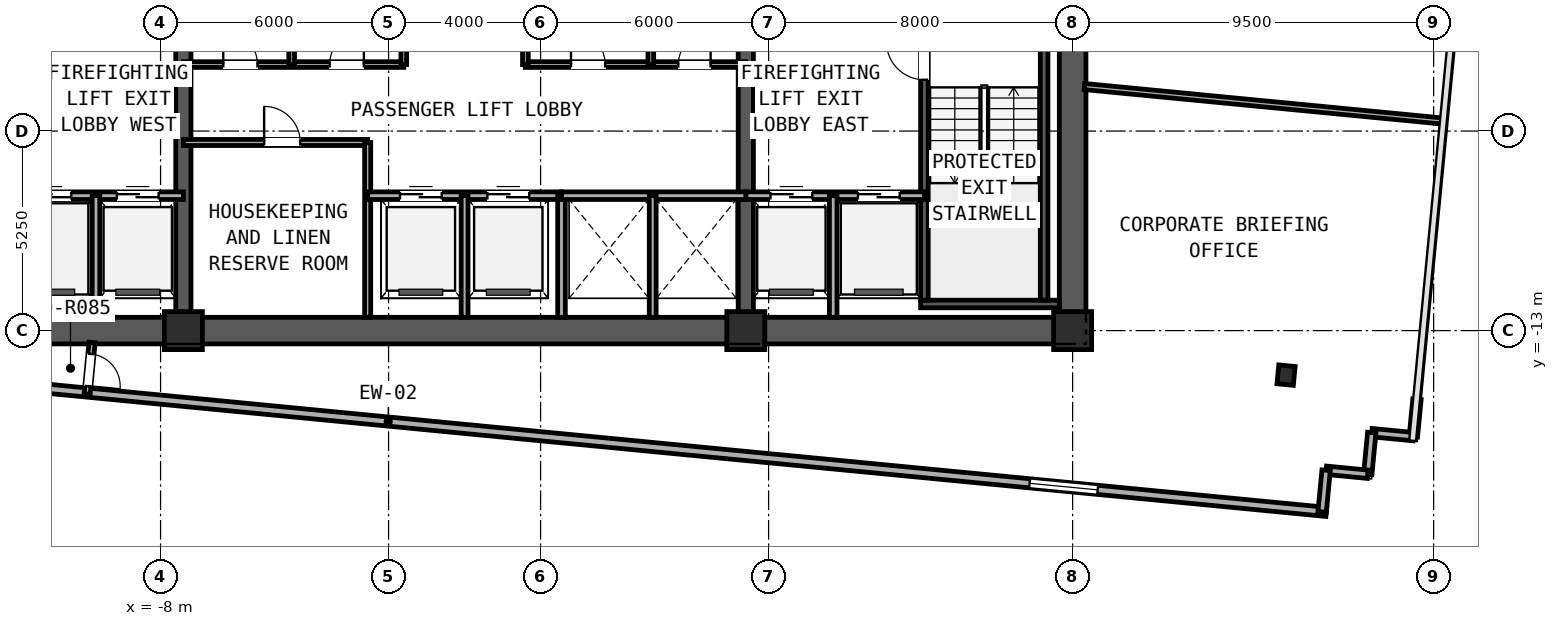
"""IFC4 building model, lengths in metres.
Left out: names, types, materials, properties, quantities, classifications, styles, units other than length and angle.
Written with IfcOpenShell. Run it as: python <this file> out.ifc"""

import sys

from ifc_helpers import new_model, si_unit, direction, frame, frame_2d, origin, origin_2d, place, context, subcontext, project, spatial, rectangle, i_section, extrude, element, fill, save


model = new_model("IFC4")
c1 = context("Model", 3, precision=1e-05, world=origin(), true_north=direction((0.0, 1.0)))
c2 = subcontext(c1, "Body", "Model", "MODEL_VIEW")
j1 = project(units=[si_unit("LENGTHUNIT", "METRE"), si_unit("PLANEANGLEUNIT", "RADIAN")], contexts=[c1])
p1 = place(None, origin())
s1 = spatial("IfcSite", under=j1, at=p1, CompositionType="ELEMENT")
p2 = place(p1, origin())
s2 = spatial("IfcBuilding", under=s1, at=p2, CompositionType="ELEMENT")
p3 = place(p2, frame((0.0, 0.0, 166.95)))
s3 = spatial("IfcBuildingStorey", under=s2, at=p3, CompositionType="ELEMENT", Elevation=166.95)
p4 = place(p3, frame((-16.35, -13.0, 0.0), z_axis=(0.0, 0.0, 1.0), x_axis=(1.0, 0.0, 0.0)))
e1 = element("IfcWall", 1, at=p4, inside=s3, PredefinedType="SHEAR", context=c2, shape_type="SweptSolid", body=[
    extrude(rectangle(XDim=32.7, YDim=0.7, at=frame_2d((16.35, 0.0))), origin(), (0.0, 0.0, 1.0), 2.91),
])
p5 = place(p3, frame((16.0, -12.65, 0.0), z_axis=(0.0, 0.0, 1.0), x_axis=(0.0, 1.0, 0.0)))
e2 = element("IfcWall", 2, at=p5, inside=s3, PredefinedType="SHEAR", context=c2, shape_type="SweptSolid", body=[
    extrude(rectangle(XDim=9.8, YDim=0.7, at=frame_2d((4.9, 0.0))), origin(), (0.0, 0.0, 1.0), 2.91),
])
for number, where, z_axis, x_axis in (
    (3, (-7.4, -12.65, 0.0), (0.0, 0.0, 1.0), (0.0, 1.0, 0.0)),
    (4, (7.4, -12.65, 0.0), (0.0, 0.0, 1.0), (0.0, 1.0, 0.0)),
):
    element("IfcWall", number, at=place(p3, frame(where, z_axis=z_axis, x_axis=x_axis)), inside=s3, PredefinedType="SHEAR", context=c2, shape_type="SweptSolid", body=[
        extrude(rectangle(XDim=9.8, YDim=0.4, at=frame_2d((4.9, 0.0))), origin(), (0.0, 0.0, 1.0), 3.19),
    ])
p6 = place(p3, frame((12.0, -12.3, 0.0), z_axis=(0.0, 0.0, 1.0), x_axis=(1.0, 0.0, 0.0)))
e5 = element("IfcWall", 5, at=p6, inside=s3, PredefinedType="SOLIDWALL", context=c2, shape_type="SweptSolid", body=[
    extrude(rectangle(XDim=3.65, YDim=0.2, at=frame_2d((1.825, 0.0))), origin(), (0.0, 0.0, 1.0), 3.19),
])
p7 = place(p3, frame((12.1, -12.2, 0.0), z_axis=(0.0, 0.0, 1.0), x_axis=(0.0, 1.0, 0.0)))
e6 = element("IfcWall", 6, at=p7, inside=s3, PredefinedType="SOLIDWALL", context=c2, shape_type="SweptSolid", body=[
    extrude(rectangle(XDim=7.0, YDim=0.2, at=frame_2d((3.5, 0.0))), origin(), (0.0, 0.0, 1.0), 3.19),
])
p8 = place(p7, frame((5.8, 0.0, 0.0)))
e7 = element("IfcOpeningElement", 7, at=p8, cuts=e6, PredefinedType="OPENING", context=c2, shape_type="SweptSolid", body=[
    extrude(rectangle(XDim=1.0, YDim=2.1, at=frame_2d((0.5, 1.05))), frame((0.0, 0.11, 0.0), z_axis=(0.0, -1.0, 0.0), x_axis=(1.0, 0.0, 0.0)), (0.0, 0.0, 1.0), 0.22),
])
p9 = place(p3, frame((15.25, -12.2, 0.0), z_axis=(0.0, 0.0, 1.0), x_axis=(0.0, 1.0, 0.0)))
e8 = element("IfcWall", 8, at=p9, inside=s3, PredefinedType="SOLIDWALL", context=c2, shape_type="SweptSolid", body=[
    extrude(rectangle(XDim=7.0, YDim=0.2, at=frame_2d((3.5, 0.0))), origin(), (0.0, 0.0, 1.0), 3.19),
])
for number, where, z_axis, x_axis in (
    (9, (-7.4, -13.0, 0.0), (0.0, 0.0, 1.0), (1.0, 0.0, 0.0)),
    (10, (7.4, -13.0, 0.0), (0.0, 0.0, 1.0), (1.0, 0.0, 0.0)),
    (11, (16.0, -13.0, 0.0), (0.0, 0.0, 1.0), (1.0, 0.0, 0.0)),
):
    element("IfcColumn", number, at=place(p3, frame(where, z_axis=z_axis, x_axis=x_axis)), inside=s3, PredefinedType="COLUMN", context=c2, shape_type="SweptSolid", body=[
        extrude(rectangle(XDim=1.0, YDim=1.0, at=origin_2d()), origin(), (0.0, 0.0, 1.0), 3.45),
    ])
p10 = place(p3, frame((21.616, -14.172, 0.0), z_axis=(0.0, 0.0, 1.0), x_axis=(0.995396198367, -0.09584575252, 0.0)))
e12 = element("IfcColumn", 12, at=p10, inside=s3, PredefinedType="COLUMN", context=c2, shape_type="SweptSolid", body=[
    extrude(i_section(OverallWidth=0.432, OverallDepth=0.498, WebThickness=0.056, FlangeThickness=0.089, FilletRadius=0.031, at=origin_2d()), origin(), (0.0, 0.0, 1.0), 3.45),
])
p11 = place(p3, frame((-26.695, -13.016, 0.0), z_axis=(0.0, 0.0, 1.0), x_axis=(0.995396268366, -0.095845025554, 0.0)))
e13 = element("IfcWall", 13, at=p11, inside=s3, PredefinedType="STANDARD", context=c2, shape_type="SweptSolid", body=[
    extrude(rectangle(XDim=49.6, YDim=0.24, at=frame_2d((24.8, 0.0))), origin(), (0.0, 0.0, 1.0), 3.19),
])
p12 = place(p11, frame((6.044, 0.0, 0.7)))
e14 = element("IfcOpeningElement", 14, at=p12, cuts=e13, PredefinedType="OPENING", context=c2, shape_type="SweptSolid", body=[
    extrude(rectangle(XDim=1.8, YDim=1.5, at=frame_2d((0.9, 0.75))), frame((0.0, 0.13, 0.0), z_axis=(0.0, -1.0, 0.0), x_axis=(1.0, 0.0, 0.0)), (0.0, 0.0, 1.0), 0.26),
])
p13 = place(p11, frame((41.756, 0.0, 0.7)))
e15 = element("IfcOpeningElement", 15, at=p13, cuts=e13, PredefinedType="OPENING", context=c2, shape_type="SweptSolid", body=[
    extrude(rectangle(XDim=1.8, YDim=1.5, at=frame_2d((0.9, 0.75))), frame((0.0, 0.13, 0.0), z_axis=(0.0, -1.0, 0.0), x_axis=(1.0, 0.0, 0.0)), (0.0, 0.0, 1.0), 0.26),
])
p14 = place(p3, frame((25.062, -14.805, 0.0), z_axis=(0.0, 0.0, 1.0), x_axis=(-0.095914428506, -0.995389583231, 0.0)))
e16 = element("IfcWall", 16, at=p14, inside=s3, PredefinedType="STANDARD", context=c2, shape_type="SweptSolid", body=[
    extrude(rectangle(XDim=0.99, YDim=0.22, at=frame_2d((0.495, 0.0))), origin(), (0.0, 0.0, 1.0), 3.19),
])
for number, where, z_axis, x_axis in (
    (17, (24.967, -15.791, 0.0), (0.0, 0.0, 1.0), (-0.995, 0.096, 0.0)),
    (18, (23.872, -15.685, 0.0), (0.0, 0.0, 1.0), (-0.096, -0.995, 0.0)),
    (19, (23.766, -16.78, 0.0), (0.0, 0.0, 1.0), (-0.995, 0.096, 0.0)),
    (20, (22.671, -16.675, 0.0), (0.0, 0.0, 1.0), (-0.096, -0.995, 0.0)),
):
    element("IfcWall", number, at=place(p3, frame(where, z_axis=z_axis, x_axis=x_axis)), inside=s3, PredefinedType="STANDARD", context=c2, shape_type="SweptSolid", body=[
        extrude(rectangle(XDim=1.1, YDim=0.22, at=frame_2d((0.55, 0.0))), origin(), (0.0, 0.0, 1.0), 3.19),
    ])
p15 = place(p3, frame((-12.1, -9.45, 0.0), z_axis=(0.0, 0.0, 1.0), x_axis=(1.0, 0.0, 0.0)))
e21 = element("IfcWall", 21, at=p15, inside=s3, PredefinedType="PARTITIONING", context=c2, shape_type="SweptSolid", body=[
    extrude(rectangle(XDim=4.7, YDim=0.2, at=frame_2d((2.35, 0.0))), origin(), (0.0, 0.0, 1.0), 3.19),
])
p16 = place(p15, frame((0.65, 0.0, 0.0)))
e22 = element("IfcOpeningElement", 22, at=p16, cuts=e21, PredefinedType="OPENING", context=c2, shape_type="SweptSolid", body=[
    extrude(rectangle(XDim=1.1, YDim=2.2, at=frame_2d((0.55, 1.1))), frame((0.0, 0.11, 0.0), z_axis=(0.0, -1.0, 0.0), x_axis=(1.0, 0.0, 0.0)), (0.0, 0.0, 1.0), 0.22),
])
p17 = place(p15, frame((2.95, 0.0, 0.0)))
e23 = element("IfcOpeningElement", 23, at=p17, cuts=e21, PredefinedType="OPENING", context=c2, shape_type="SweptSolid", body=[
    extrude(rectangle(XDim=1.1, YDim=2.2, at=frame_2d((0.55, 1.1))), frame((0.0, 0.11, 0.0), z_axis=(0.0, -1.0, 0.0), x_axis=(1.0, 0.0, 0.0)), (0.0, 0.0, 1.0), 0.22),
])
p18 = place(p3, frame((-9.7, -12.65, 0.0), z_axis=(0.0, 0.0, 1.0), x_axis=(0.0, 1.0, 0.0)))
e24 = element("IfcWall", 24, at=p18, inside=s3, PredefinedType="PARTITIONING", context=c2, shape_type="SweptSolid", body=[
    extrude(rectangle(XDim=3.2, YDim=0.2, at=frame_2d((1.6, 0.0))), origin(), (0.0, 0.0, 1.0), 2.225),
])
p19 = place(p3, frame((7.4, -9.45, 0.0), z_axis=(0.0, 0.0, 1.0), x_axis=(1.0, 0.0, 0.0)))
e25 = element("IfcWall", 25, at=p19, inside=s3, PredefinedType="PARTITIONING", context=c2, shape_type="SweptSolid", body=[
    extrude(rectangle(XDim=4.7, YDim=0.2, at=frame_2d((2.35, 0.0))), origin(), (0.0, 0.0, 1.0), 3.19),
])
p20 = place(p19, frame((2.95, 0.0, 0.0)))
e26 = element("IfcOpeningElement", 26, at=p20, cuts=e25, PredefinedType="OPENING", context=c2, shape_type="SweptSolid", body=[
    extrude(rectangle(XDim=1.1, YDim=2.2, at=frame_2d((0.55, 1.1))), frame((0.0, 0.11, 0.0), z_axis=(0.0, -1.0, 0.0), x_axis=(1.0, 0.0, 0.0)), (0.0, 0.0, 1.0), 0.22),
])
p21 = place(p19, frame((0.65, 0.0, 0.0)))
e27 = element("IfcOpeningElement", 27, at=p21, cuts=e25, PredefinedType="OPENING", context=c2, shape_type="SweptSolid", body=[
    extrude(rectangle(XDim=1.1, YDim=2.2, at=frame_2d((0.55, 1.1))), frame((0.0, 0.11, 0.0), z_axis=(0.0, -1.0, 0.0), x_axis=(1.0, 0.0, 0.0)), (0.0, 0.0, 1.0), 0.22),
])
p22 = place(p3, frame((9.7, -12.65, 0.0), z_axis=(0.0, 0.0, 1.0), x_axis=(0.0, 1.0, 0.0)))
e28 = element("IfcWall", 28, at=p22, inside=s3, PredefinedType="PARTITIONING", context=c2, shape_type="SweptSolid", body=[
    extrude(rectangle(XDim=3.2, YDim=0.2, at=frame_2d((1.6, 0.0))), origin(), (0.0, 0.0, 1.0), 2.225),
])
p23 = place(p3, frame((-7.4, -8.05, 0.0), z_axis=(0.0, 0.0, 1.0), x_axis=(1.0, 0.0, 0.0)))
e29 = element("IfcWall", 29, at=p23, inside=s3, PredefinedType="PARTITIONING", context=c2, shape_type="SweptSolid", body=[
    extrude(rectangle(XDim=4.85, YDim=0.16, at=frame_2d((2.425, 0.0))), origin(), (0.0, 0.0, 1.0), 3.19),
])
p24 = place(p23, frame((2.125, 0.0, 0.0)))
e30 = element("IfcOpeningElement", 30, at=p24, cuts=e29, PredefinedType="OPENING", context=c2, shape_type="SweptSolid", body=[
    extrude(rectangle(XDim=0.95, YDim=2.15, at=frame_2d((0.475, 1.075))), frame((0.0, 0.09, 0.0), z_axis=(0.0, -1.0, 0.0), x_axis=(1.0, 0.0, 0.0)), (0.0, 0.0, 1.0), 0.18),
])
p25 = place(p3, frame((-2.55, -12.65, 0.0), z_axis=(0.0, 0.0, 1.0), x_axis=(0.0, 1.0, 0.0)))
e31 = element("IfcWall", 31, at=p25, inside=s3, PredefinedType="PARTITIONING", context=c2, shape_type="SweptSolid", body=[
    extrude(rectangle(XDim=4.6, YDim=0.16, at=frame_2d((2.3, 0.0))), origin(), (0.0, 0.0, 1.0), 2.225),
])
p26 = place(p3, frame((-2.55, -9.45, 0.0), z_axis=(0.0, 0.0, 1.0), x_axis=(1.0, 0.0, 0.0)))
e32 = element("IfcWall", 32, at=p26, inside=s3, PredefinedType="PARTITIONING", context=c2, shape_type="SweptSolid", body=[
    extrude(rectangle(XDim=5.1, YDim=0.2, at=frame_2d((2.55, 0.0))), origin(), (0.0, 0.0, 1.0), 3.19),
])
p27 = place(p26, frame((0.85, 0.0, 0.0)))
e33 = element("IfcOpeningElement", 33, at=p27, cuts=e32, PredefinedType="OPENING", context=c2, shape_type="SweptSolid", body=[
    extrude(rectangle(XDim=1.1, YDim=2.2, at=frame_2d((0.55, 1.1))), frame((0.0, 0.11, 0.0), z_axis=(0.0, -1.0, 0.0), x_axis=(1.0, 0.0, 0.0)), (0.0, 0.0, 1.0), 0.22),
])
p28 = place(p26, frame((3.15, 0.0, 0.0)))
e34 = element("IfcOpeningElement", 34, at=p28, cuts=e32, PredefinedType="OPENING", context=c2, shape_type="SweptSolid", body=[
    extrude(rectangle(XDim=1.1, YDim=2.2, at=frame_2d((0.55, 1.1))), frame((0.0, 0.11, 0.0), z_axis=(0.0, -1.0, 0.0), x_axis=(1.0, 0.0, 0.0)), (0.0, 0.0, 1.0), 0.22),
])
p29 = place(p3, frame((0.0, -12.65, 0.0), z_axis=(0.0, 0.0, 1.0), x_axis=(0.0, 1.0, 0.0)))
e35 = element("IfcWall", 35, at=p29, inside=s3, PredefinedType="PARTITIONING", context=c2, shape_type="SweptSolid", body=[
    extrude(rectangle(XDim=3.2, YDim=0.18, at=frame_2d((1.6, 0.0))), origin(), (0.0, 0.0, 1.0), 2.225),
])
p30 = place(p3, frame((2.55, -12.65, 0.0), z_axis=(0.0, 0.0, 1.0), x_axis=(0.0, 1.0, 0.0)))
e36 = element("IfcWall", 36, at=p30, inside=s3, PredefinedType="PARTITIONING", context=c2, shape_type="SweptSolid", body=[
    extrude(rectangle(XDim=3.2, YDim=0.2, at=frame_2d((1.6, 0.0))), origin(), (0.0, 0.0, 1.0), 2.225),
])
p31 = place(p3, frame((2.55, -9.45, 0.0), z_axis=(0.0, 0.0, 1.0), x_axis=(1.0, 0.0, 0.0)))
e37 = element("IfcWall", 37, at=p31, inside=s3, PredefinedType="PARTITIONING", context=c2, shape_type="SweptSolid", body=[
    extrude(rectangle(XDim=4.85, YDim=0.2, at=frame_2d((2.425, 0.0))), origin(), (0.0, 0.0, 1.0), 3.19),
])
p32 = place(p3, frame((4.95, -12.65, 0.0), z_axis=(0.0, 0.0, 1.0), x_axis=(0.0, 1.0, 0.0)))
e38 = element("IfcWall", 38, at=p32, inside=s3, PredefinedType="PARTITIONING", context=c2, shape_type="SweptSolid", body=[
    extrude(rectangle(XDim=3.2, YDim=0.18, at=frame_2d((1.6, 0.0))), origin(), (0.0, 0.0, 1.0), 2.225),
])
p33 = place(p3, frame((-7.4, -6.0, 0.0), z_axis=(0.0, 0.0, 1.0), x_axis=(1.0, 0.0, 0.0)))
e39 = element("IfcWall", 39, at=p33, inside=s3, PredefinedType="PARTITIONING", context=c2, shape_type="SweptSolid", body=[
    extrude(rectangle(XDim=5.8, YDim=0.15, at=frame_2d((2.9, 0.0))), origin(), (0.0, 0.0, 1.0), 3.19),
])
p34 = place(p33, frame((1.05, 0.0, 0.0)))
e40 = element("IfcOpeningElement", 40, at=p34, cuts=e39, PredefinedType="OPENING", context=c2, shape_type="SweptSolid", body=[
    extrude(rectangle(XDim=0.9, YDim=2.1, at=frame_2d((0.45, 1.05))), frame((0.0, 0.085, 0.0), z_axis=(0.0, -1.0, 0.0), x_axis=(1.0, 0.0, 0.0)), (0.0, 0.0, 1.0), 0.17),
])
p35 = place(p33, frame((3.85, 0.0, 0.0)))
e41 = element("IfcOpeningElement", 41, at=p35, cuts=e39, PredefinedType="OPENING", context=c2, shape_type="SweptSolid", body=[
    extrude(rectangle(XDim=0.9, YDim=2.1, at=frame_2d((0.45, 1.05))), frame((0.0, 0.085, 0.0), z_axis=(0.0, -1.0, 0.0), x_axis=(1.0, 0.0, 0.0)), (0.0, 0.0, 1.0), 0.17),
])
p36 = place(p3, frame((-1.6, -6.0, 0.0), z_axis=(0.0, 0.0, 1.0), x_axis=(0.0, 1.0, 0.0)))
e42 = element("IfcWall", 42, at=p36, inside=s3, PredefinedType="PARTITIONING", context=c2, shape_type="SweptSolid", body=[
    extrude(rectangle(XDim=3.5, YDim=0.15, at=frame_2d((1.75, 0.0))), origin(), (0.0, 0.0, 1.0), 2.225),
])
p37 = place(p3, frame((1.6, -6.0, 0.0), z_axis=(0.0, 0.0, 1.0), x_axis=(1.0, 0.0, 0.0)))
e43 = element("IfcWall", 43, at=p37, inside=s3, PredefinedType="PARTITIONING", context=c2, shape_type="SweptSolid", body=[
    extrude(rectangle(XDim=5.8, YDim=0.15, at=frame_2d((2.9, 0.0))), origin(), (0.0, 0.0, 1.0), 3.19),
])
p38 = place(p37, frame((1.2, 0.0, 0.0)))
e44 = element("IfcOpeningElement", 44, at=p38, cuts=e43, PredefinedType="OPENING", context=c2, shape_type="SweptSolid", body=[
    extrude(rectangle(XDim=0.9, YDim=2.1, at=frame_2d((0.45, 1.05))), frame((0.0, 0.085, 0.0), z_axis=(0.0, -1.0, 0.0), x_axis=(1.0, 0.0, 0.0)), (0.0, 0.0, 1.0), 0.17),
])
p39 = place(p37, frame((4.025, 0.0, 0.0)))
e45 = element("IfcOpeningElement", 45, at=p39, cuts=e43, PredefinedType="OPENING", context=c2, shape_type="SweptSolid", body=[
    extrude(rectangle(XDim=0.85, YDim=2.05, at=frame_2d((0.425, 1.025))), frame((0.0, 0.085, 0.0), z_axis=(0.0, -1.0, 0.0), x_axis=(1.0, 0.0, 0.0)), (0.0, 0.0, 1.0), 0.17),
])
for number, where, z_axis, x_axis in (
    (46, (1.6, -6.0, 0.0), (0.0, 0.0, 1.0), (0.0, 1.0, 0.0)),
    (47, (-4.55, -6.0, 0.0), (0.0, 0.0, 1.0), (0.0, 1.0, 0.0)),
    (48, (4.9, -6.0, 0.0), (0.0, 0.0, 1.0), (0.0, 1.0, 0.0)),
):
    element("IfcWall", number, at=place(p3, frame(where, z_axis=z_axis, x_axis=x_axis)), inside=s3, PredefinedType="PARTITIONING", context=c2, shape_type="SweptSolid", body=[
        extrude(rectangle(XDim=3.5, YDim=0.15, at=frame_2d((1.75, 0.0))), origin(), (0.0, 0.0, 1.0), 2.225),
    ])
p40 = place(p3, frame((-9.802, -13.31, 0.0), z_axis=(0.0, 0.0, 1.0), x_axis=(-0.095930256126, -0.995388057975, 0.0)))
e49 = element("IfcWall", 49, at=p40, inside=s3, PredefinedType="PARTITIONING", context=c2, shape_type="SweptSolid", body=[
    extrude(rectangle(XDim=1.367, YDim=0.16, at=frame_2d((0.683, 0.0))), origin(), (0.0, 0.0, 1.0), 2.225),
])
p41 = place(p40, frame((0.306, 0.0, 0.0)))
e50 = element("IfcOpeningElement", 50, at=p41, cuts=e49, PredefinedType="OPENING", context=c2, shape_type="SweptSolid", body=[
    extrude(rectangle(XDim=0.85, YDim=2.05, at=frame_2d((0.425, 1.025))), frame((0.0, 0.09, 0.0), z_axis=(0.0, -1.0, 0.0), x_axis=(1.0, 0.0, 0.0)), (0.0, 0.0, 1.0), 0.18),
])
p42 = place(p3, frame((25.796, -7.492, 0.0), z_axis=(0.0, 0.0, 1.0), x_axis=(-0.995396487733, 0.095842747294, 0.0)))
e51 = element("IfcWall", 51, at=p42, inside=s3, PredefinedType="PARTITIONING", context=c2, shape_type="SweptSolid", body=[
    extrude(rectangle(XDim=9.53, YDim=0.16, at=frame_2d((4.765, 0.0))), origin(), (0.0, 0.0, 1.0), 2.225),
])
p43 = place(p13, origin())
e52 = element("IfcWindow", 52, at=p43, inside=s3, PartitioningType="SINGLE_PANEL", PredefinedType="WINDOW", context=c2, shape_type="SweptSolid", body=[
    extrude(rectangle(XDim=1.8, YDim=1.5, at=frame_2d((0.9, 0.75))), frame((0.0, 0.03, 0.0), z_axis=(0.0, -1.0, 0.0), x_axis=(1.0, 0.0, 0.0)), (0.0, 0.0, 1.0), 0.06),
])
fill(e15, e52)
p44 = place(p8, origin())
e53 = element("IfcDoor", 53, at=p44, inside=s3, OperationType="SINGLE_SWING_RIGHT", PredefinedType="DOOR", context=c2, shape_type="SweptSolid", body=[
    extrude(rectangle(XDim=1.0, YDim=2.1, at=frame_2d((0.5, 1.05))), frame((0.0, 0.025, 0.0), z_axis=(0.0, -1.0, 0.0), x_axis=(1.0, 0.0, 0.0)), (0.0, 0.0, 1.0), 0.05),
])
fill(e7, e53)
p45 = place(p16, origin())
e54 = element("IfcDoor", 54, at=p45, inside=s3, OperationType="SLIDING_TO_LEFT", PredefinedType="DOOR", context=c2, shape_type="SweptSolid", body=[
    extrude(rectangle(XDim=1.1, YDim=2.2, at=frame_2d((0.55, 1.1))), frame((0.0, 0.025, 0.0), z_axis=(0.0, -1.0, 0.0), x_axis=(1.0, 0.0, 0.0)), (0.0, 0.0, 1.0), 0.05),
])
fill(e22, e54)
p46 = place(p17, origin())
e55 = element("IfcDoor", 55, at=p46, inside=s3, OperationType="SLIDING_TO_RIGHT", PredefinedType="DOOR", context=c2, shape_type="SweptSolid", body=[
    extrude(rectangle(XDim=1.1, YDim=2.2, at=frame_2d((0.55, 1.1))), frame((0.0, 0.025, 0.0), z_axis=(0.0, -1.0, 0.0), x_axis=(1.0, 0.0, 0.0)), (0.0, 0.0, 1.0), 0.05),
])
fill(e23, e55)
p47 = place(p20, origin())
e56 = element("IfcDoor", 56, at=p47, inside=s3, OperationType="SLIDING_TO_LEFT", PredefinedType="DOOR", context=c2, shape_type="SweptSolid", body=[
    extrude(rectangle(XDim=1.1, YDim=2.2, at=frame_2d((0.55, 1.1))), frame((0.0, 0.025, 0.0), z_axis=(0.0, -1.0, 0.0), x_axis=(1.0, 0.0, 0.0)), (0.0, 0.0, 1.0), 0.05),
])
fill(e26, e56)
p48 = place(p21, origin())
e57 = element("IfcDoor", 57, at=p48, inside=s3, OperationType="SLIDING_TO_RIGHT", PredefinedType="DOOR", context=c2, shape_type="SweptSolid", body=[
    extrude(rectangle(XDim=1.1, YDim=2.2, at=frame_2d((0.55, 1.1))), frame((0.0, 0.025, 0.0), z_axis=(0.0, -1.0, 0.0), x_axis=(1.0, 0.0, 0.0)), (0.0, 0.0, 1.0), 0.05),
])
fill(e27, e57)
p49 = place(p24, origin())
e58 = element("IfcDoor", 58, at=p49, inside=s3, OperationType="SINGLE_SWING_LEFT", PredefinedType="DOOR", context=c2, shape_type="SweptSolid", body=[
    extrude(rectangle(XDim=0.95, YDim=2.15, at=frame_2d((0.475, 1.075))), frame((0.0, 0.025, 0.0), z_axis=(0.0, -1.0, 0.0), x_axis=(1.0, 0.0, 0.0)), (0.0, 0.0, 1.0), 0.05),
])
fill(e30, e58)
p50 = place(p27, origin())
e59 = element("IfcDoor", 59, at=p50, inside=s3, OperationType="SLIDING_TO_RIGHT", PredefinedType="DOOR", context=c2, shape_type="SweptSolid", body=[
    extrude(rectangle(XDim=1.1, YDim=2.2, at=frame_2d((0.55, 1.1))), frame((0.0, 0.025, 0.0), z_axis=(0.0, -1.0, 0.0), x_axis=(1.0, 0.0, 0.0)), (0.0, 0.0, 1.0), 0.05),
])
fill(e33, e59)
p51 = place(p28, origin())
e60 = element("IfcDoor", 60, at=p51, inside=s3, OperationType="SLIDING_TO_RIGHT", PredefinedType="DOOR", context=c2, shape_type="SweptSolid", body=[
    extrude(rectangle(XDim=1.1, YDim=2.2, at=frame_2d((0.55, 1.1))), frame((0.0, 0.025, 0.0), z_axis=(0.0, -1.0, 0.0), x_axis=(1.0, 0.0, 0.0)), (0.0, 0.0, 1.0), 0.05),
])
fill(e34, e60)
p52 = place(p34, frame((0.9, 0.0, 0.0), z_axis=(0.0, 0.0, 1.0), x_axis=(-1.0, 0.0, 0.0)))
e61 = element("IfcDoor", 61, at=p52, inside=s3, OperationType="SINGLE_SWING_LEFT", PredefinedType="DOOR", context=c2, shape_type="SweptSolid", body=[
    extrude(rectangle(XDim=0.9, YDim=2.1, at=frame_2d((0.45, 1.05))), frame((0.0, 0.025, 0.0), z_axis=(0.0, -1.0, 0.0), x_axis=(1.0, 0.0, 0.0)), (0.0, 0.0, 1.0), 0.05),
])
fill(e40, e61)
p53 = place(p35, frame((0.9, 0.0, 0.0), z_axis=(0.0, 0.0, 1.0), x_axis=(-1.0, 0.0, 0.0)))
e62 = element("IfcDoor", 62, at=p53, inside=s3, OperationType="SINGLE_SWING_RIGHT", PredefinedType="DOOR", context=c2, shape_type="SweptSolid", body=[
    extrude(rectangle(XDim=0.9, YDim=2.1, at=frame_2d((0.45, 1.05))), frame((0.0, 0.025, 0.0), z_axis=(0.0, -1.0, 0.0), x_axis=(1.0, 0.0, 0.0)), (0.0, 0.0, 1.0), 0.05),
])
fill(e41, e62)
p54 = place(p38, frame((0.9, 0.0, 0.0), z_axis=(0.0, 0.0, 1.0), x_axis=(-1.0, 0.0, 0.0)))
e63 = element("IfcDoor", 63, at=p54, inside=s3, OperationType="SINGLE_SWING_LEFT", PredefinedType="DOOR", context=c2, shape_type="SweptSolid", body=[
    extrude(rectangle(XDim=0.9, YDim=2.1, at=frame_2d((0.45, 1.05))), frame((0.0, 0.025, 0.0), z_axis=(0.0, -1.0, 0.0), x_axis=(1.0, 0.0, 0.0)), (0.0, 0.0, 1.0), 0.05),
])
fill(e44, e63)
p55 = place(p39, frame((0.85, 0.0, 0.0), z_axis=(0.0, 0.0, 1.0), x_axis=(-1.0, 0.0, 0.0)))
e64 = element("IfcDoor", 64, at=p55, inside=s3, OperationType="SINGLE_SWING_RIGHT", PredefinedType="DOOR", context=c2, shape_type="SweptSolid", body=[
    extrude(rectangle(XDim=0.85, YDim=2.05, at=frame_2d((0.425, 1.025))), frame((0.0, 0.025, 0.0), z_axis=(0.0, -1.0, 0.0), x_axis=(1.0, 0.0, 0.0)), (0.0, 0.0, 1.0), 0.05),
])
fill(e45, e64)
p56 = place(p41, frame((0.85, 0.0, 0.0), z_axis=(0.0, 0.0, 1.0), x_axis=(-1.0, 0.0, 0.0)))
e65 = element("IfcDoor", 65, at=p56, inside=s3, OperationType="SINGLE_SWING_RIGHT", PredefinedType="DOOR", context=c2, shape_type="SweptSolid", body=[
    extrude(rectangle(XDim=0.85, YDim=2.05, at=frame_2d((0.425, 1.025))), frame((0.0, 0.025, 0.0), z_axis=(0.0, -1.0, 0.0), x_axis=(1.0, 0.0, 0.0)), (0.0, 0.0, 1.0), 0.05),
])
fill(e50, e65)
save(model, sys.argv[1])
